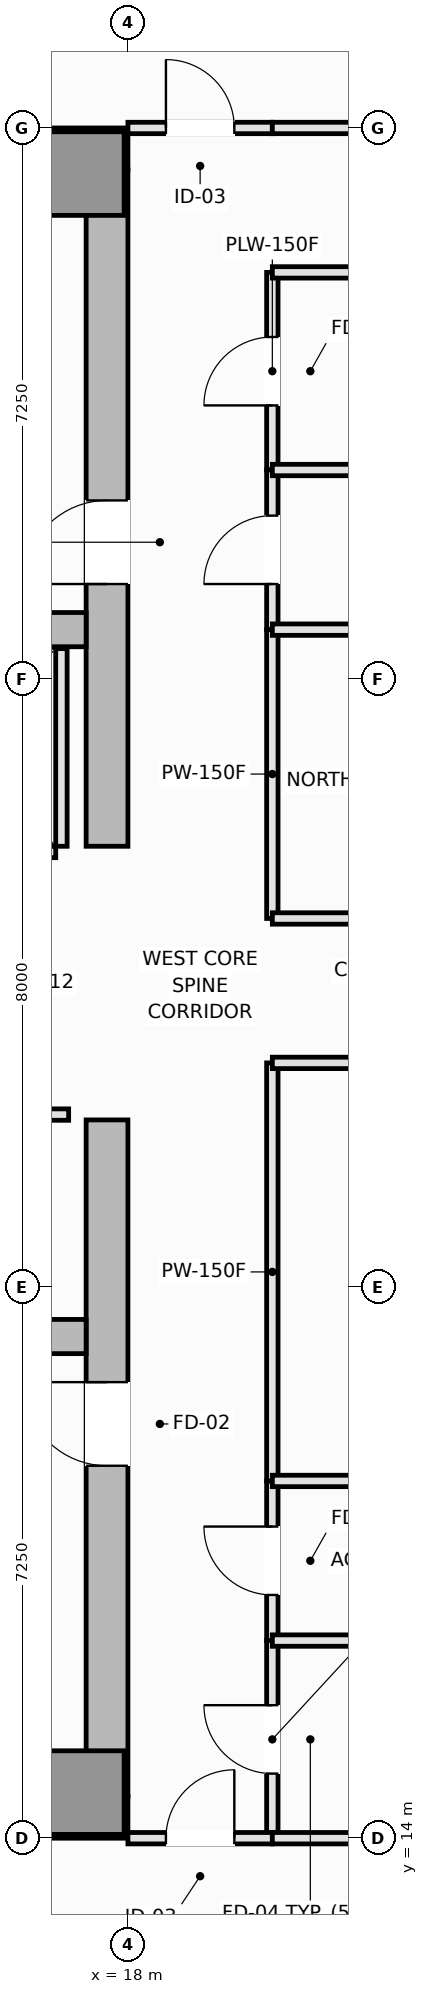
"""IFC4 building model, lengths in metres.
Left out: names, types, materials, properties, quantities, classifications, styles, units other than length and angle.
Written with IfcOpenShell. Run it as: python <this file> out.ifc"""

import sys

from ifc_helpers import new_model, si_unit, direction, frame, frame_2d, origin, origin_2d, place, context, subcontext, project, spatial, rectangle, extrude, element, fill, save


model = new_model("IFC4")
c1 = context("Model", 3, precision=1e-05, world=origin(), true_north=direction((0.0, 1.0)))
c2 = subcontext(c1, "Body", "Model", "MODEL_VIEW")
j1 = project(units=[si_unit("LENGTHUNIT", "METRE"), si_unit("PLANEANGLEUNIT", "RADIAN")], contexts=[c1])
p1 = place(None, origin())
s1 = spatial("IfcSite", under=j1, at=p1, CompositionType="ELEMENT")
p2 = place(p1, origin())
s2 = spatial("IfcBuilding", under=s1, at=p2, CompositionType="ELEMENT")
p3 = place(p2, frame((0.0, 0.0, 188.05)))
s3 = spatial("IfcBuildingStorey", under=s2, at=p3, CompositionType="ELEMENT", Elevation=188.05)
for number, where, z_axis, x_axis in (
    (1, (4.5, 14.275, 0.0), (0.0, 0.0, 1.0), (1.0, 0.0, 0.0)),
    (2, (4.5, 36.225, 0.0), (0.0, 0.0, 1.0), (1.0, 0.0, 0.0)),
):
    element("IfcWall", number, at=place(p3, frame(where, z_axis=z_axis, x_axis=x_axis)), inside=s3, PredefinedType="SHEAR", context=c2, shape_type="SweptSolid", body=[
        extrude(rectangle(XDim=13.5, YDim=0.55, at=frame_2d((6.75, 0.0))), origin(), (0.0, 0.0, 1.0), 3.55),
    ])
p4 = place(p3, frame((17.725, 14.55, 0.0), z_axis=(0.0, 0.0, 1.0), x_axis=(0.0, 1.0, 0.0)))
e3 = element("IfcWall", 3, at=p4, inside=s3, PredefinedType="SHEAR", context=c2, shape_type="SweptSolid", body=[
    extrude(rectangle(XDim=8.9, YDim=0.55, at=frame_2d((4.45, 0.0))), origin(), (0.0, 0.0, 1.0), 3.55),
])
p5 = place(p4, frame((4.35, 0.0, 0.0)))
e4 = element("IfcOpeningElement", 4, at=p5, cuts=e3, PredefinedType="OPENING", context=c2, shape_type="SweptSolid", body=[
    extrude(rectangle(XDim=1.1, YDim=2.15, at=frame_2d((0.55, 1.075))), frame((0.0, 0.285, 0.0), z_axis=(0.0, -1.0, 0.0), x_axis=(1.0, 0.0, 0.0)), (0.0, 0.0, 1.0), 0.57),
])
p6 = place(p3, frame((17.725, 27.05, 0.0), z_axis=(0.0, 0.0, 1.0), x_axis=(0.0, 1.0, 0.0)))
e5 = element("IfcWall", 5, at=p6, inside=s3, PredefinedType="SHEAR", context=c2, shape_type="SweptSolid", body=[
    extrude(rectangle(XDim=8.9, YDim=0.55, at=frame_2d((4.45, 0.0))), origin(), (0.0, 0.0, 1.0), 3.55),
])
p7 = place(p6, frame((3.45, 0.0, 0.0)))
e6 = element("IfcOpeningElement", 6, at=p7, cuts=e5, PredefinedType="OPENING", context=c2, shape_type="SweptSolid", body=[
    extrude(rectangle(XDim=1.1, YDim=2.15, at=frame_2d((0.55, 1.075))), frame((0.0, 0.285, 0.0), z_axis=(0.0, -1.0, 0.0), x_axis=(1.0, 0.0, 0.0)), (0.0, 0.0, 1.0), 0.57),
])
for number, where, z_axis, x_axis in (
    (7, (5.05, 20.6, 0.0), (0.0, 0.0, 1.0), (1.0, 0.0, 0.0)),
    (8, (5.05, 29.9, 0.0), (0.0, 0.0, 1.0), (1.0, 0.0, 0.0)),
):
    element("IfcWall", number, at=place(p3, frame(where, z_axis=z_axis, x_axis=x_axis)), inside=s3, PredefinedType="SHEAR", context=c2, shape_type="SweptSolid", body=[
        extrude(rectangle(XDim=12.4, YDim=0.45, at=frame_2d((6.2, 0.0))), origin(), (0.0, 0.0, 1.0), 3.55),
    ])
for number, where, z_axis, x_axis in (
    (9, (17.4, 14.6, 0.0), (0.0, 0.0, 1.0), (1.0, 0.0, 0.0)),
    (10, (17.4, 35.9, 0.0), (0.0, 0.0, 1.0), (1.0, 0.0, 0.0)),
):
    element("IfcColumn", number, at=place(p3, frame(where, z_axis=z_axis, x_axis=x_axis)), inside=s3, PredefinedType="PILASTER", context=c2, shape_type="SweptSolid", body=[
        extrude(rectangle(XDim=1.1, YDim=1.1, at=origin_2d()), origin(), (0.0, 0.0, 1.0), 3.55),
    ])
p8 = place(p3, frame((14.5, 26.975, 0.0), z_axis=(0.0, 0.0, 1.0), x_axis=(1.0, 0.0, 0.0)))
e11 = element("IfcWall", 11, at=p8, inside=s3, PredefinedType="PARTITIONING", context=c2, shape_type="SweptSolid", body=[
    extrude(rectangle(XDim=2.55, YDim=0.15, at=frame_2d((1.275, 0.0))), origin(), (0.0, 0.0, 1.0), 3.37),
])
p9 = place(p8, frame((0.625, 0.0, 0.0)))
e12 = element("IfcOpeningElement", 12, at=p9, cuts=e11, PredefinedType="OPENING", context=c2, shape_type="SweptSolid", body=[
    extrude(rectangle(XDim=1.3, YDim=2.2, at=frame_2d((0.65, 1.1))), frame((0.0, 0.085, 0.0), z_axis=(0.0, -1.0, 0.0), x_axis=(1.0, 0.0, 0.0)), (0.0, 0.0, 1.0), 0.17),
])
p10 = place(p3, frame((17.125, 27.05, 0.0), z_axis=(0.0, 0.0, 1.0), x_axis=(0.0, 1.0, 0.0)))
e13 = element("IfcWall", 13, at=p10, inside=s3, PredefinedType="PARTITIONING", context=c2, shape_type="SweptSolid", body=[
    extrude(rectangle(XDim=2.6, YDim=0.15, at=frame_2d((1.3, 0.0))), origin(), (0.0, 0.0, 1.0), 3.37),
])
p11 = place(p3, frame((16.05, 23.52, 0.0), z_axis=(0.0, 0.0, 1.0), x_axis=(1.0, 0.0, 0.0)))
e14 = element("IfcWall", 14, at=p11, inside=s3, PredefinedType="PARTITIONING", context=c2, shape_type="SweptSolid", body=[
    extrude(rectangle(XDim=1.17, YDim=0.15, at=frame_2d((0.585, 0.0))), origin(), (0.0, 0.0, 1.0), 3.37),
])
p12 = place(p3, frame((19.9, 14.0, 0.0), z_axis=(0.0, 0.0, 1.0), x_axis=(0.0, 1.0, 0.0)))
e15 = element("IfcWall", 15, at=p12, inside=s3, PredefinedType="PLUMBINGWALL", context=c2, shape_type="SweptSolid", body=[
    extrude(rectangle(XDim=2.6, YDim=0.15, at=frame_2d((1.3, 0.0))), origin(), (0.0, 0.0, 1.0), 3.37),
])
p13 = place(p12, frame((0.85, 0.0, 0.0)))
e16 = element("IfcOpeningElement", 16, at=p13, cuts=e15, PredefinedType="OPENING", context=c2, shape_type="SweptSolid", body=[
    extrude(rectangle(XDim=0.9, YDim=2.1, at=frame_2d((0.45, 1.05))), frame((0.0, 0.085, 0.0), z_axis=(0.0, -1.0, 0.0), x_axis=(1.0, 0.0, 0.0)), (0.0, 0.0, 1.0), 0.17),
])
p14 = place(p3, frame((19.9, 32.0, 0.0), z_axis=(0.0, 0.0, 1.0), x_axis=(0.0, 1.0, 0.0)))
e17 = element("IfcWall", 17, at=p14, inside=s3, PredefinedType="PLUMBINGWALL", context=c2, shape_type="SweptSolid", body=[
    extrude(rectangle(XDim=2.6, YDim=0.15, at=frame_2d((1.3, 0.0))), origin(), (0.0, 0.0, 1.0), 3.37),
])
p15 = place(p14, frame((0.85, 0.0, 0.0)))
e18 = element("IfcOpeningElement", 18, at=p15, cuts=e17, PredefinedType="OPENING", context=c2, shape_type="SweptSolid", body=[
    extrude(rectangle(XDim=0.9, YDim=2.1, at=frame_2d((0.45, 1.05))), frame((0.0, 0.085, 0.0), z_axis=(0.0, -1.0, 0.0), x_axis=(1.0, 0.0, 0.0)), (0.0, 0.0, 1.0), 0.17),
])
p16 = place(p3, frame((19.9, 16.6, 0.0), z_axis=(0.0, 0.0, 1.0), x_axis=(0.0, 1.0, 0.0)))
e19 = element("IfcWall", 19, at=p16, inside=s3, PredefinedType="PLUMBINGWALL", context=c2, shape_type="SweptSolid", body=[
    extrude(rectangle(XDim=2.1, YDim=0.15, at=frame_2d((1.05, 0.0))), origin(), (0.0, 0.0, 1.0), 3.37),
])
p17 = place(p16, frame((0.6, 0.0, 0.0)))
e20 = element("IfcOpeningElement", 20, at=p17, cuts=e19, PredefinedType="OPENING", context=c2, shape_type="SweptSolid", body=[
    extrude(rectangle(XDim=0.9, YDim=2.1, at=frame_2d((0.45, 1.05))), frame((0.0, 0.085, 0.0), z_axis=(0.0, -1.0, 0.0), x_axis=(1.0, 0.0, 0.0)), (0.0, 0.0, 1.0), 0.17),
])
p18 = place(p3, frame((19.9, 29.9, 0.0), z_axis=(0.0, 0.0, 1.0), x_axis=(0.0, 1.0, 0.0)))
e21 = element("IfcWall", 21, at=p18, inside=s3, PredefinedType="PLUMBINGWALL", context=c2, shape_type="SweptSolid", body=[
    extrude(rectangle(XDim=2.1, YDim=0.15, at=frame_2d((1.05, 0.0))), origin(), (0.0, 0.0, 1.0), 3.37),
])
p19 = place(p18, frame((0.6, 0.0, 0.0)))
e22 = element("IfcOpeningElement", 22, at=p19, cuts=e21, PredefinedType="OPENING", context=c2, shape_type="SweptSolid", body=[
    extrude(rectangle(XDim=0.9, YDim=2.1, at=frame_2d((0.45, 1.05))), frame((0.0, 0.085, 0.0), z_axis=(0.0, -1.0, 0.0), x_axis=(1.0, 0.0, 0.0)), (0.0, 0.0, 1.0), 0.17),
])
p20 = place(p3, frame((19.9, 18.7, 0.0), z_axis=(0.0, 0.0, 1.0), x_axis=(0.0, 1.0, 0.0)))
e23 = element("IfcWall", 23, at=p20, inside=s3, PredefinedType="PARTITIONING", context=c2, shape_type="SweptSolid", body=[
    extrude(rectangle(XDim=5.5, YDim=0.15, at=frame_2d((2.75, 0.0))), origin(), (0.0, 0.0, 1.0), 3.37),
])
p21 = place(p3, frame((19.9, 26.1, 0.0), z_axis=(0.0, 0.0, 1.0), x_axis=(0.0, 1.0, 0.0)))
e24 = element("IfcWall", 24, at=p21, inside=s3, PredefinedType="PARTITIONING", context=c2, shape_type="SweptSolid", body=[
    extrude(rectangle(XDim=3.8, YDim=0.15, at=frame_2d((1.9, 0.0))), origin(), (0.0, 0.0, 1.0), 3.37),
])
p22 = place(p3, frame((18.0, 14.0, 0.0), z_axis=(0.0, 0.0, 1.0), x_axis=(1.0, 0.0, 0.0)))
e25 = element("IfcWall", 25, at=p22, inside=s3, PredefinedType="PARTITIONING", context=c2, shape_type="SweptSolid", body=[
    extrude(rectangle(XDim=1.9, YDim=0.15, at=frame_2d((0.95, 0.0))), origin(), (0.0, 0.0, 1.0), 3.37),
])
p23 = place(p22, frame((0.5, 0.0, 0.0)))
e26 = element("IfcOpeningElement", 26, at=p23, cuts=e25, PredefinedType="OPENING", context=c2, shape_type="SweptSolid", body=[
    extrude(rectangle(XDim=0.9, YDim=2.1, at=frame_2d((0.45, 1.05))), frame((0.0, 0.085, 0.0), z_axis=(0.0, -1.0, 0.0), x_axis=(1.0, 0.0, 0.0)), (0.0, 0.0, 1.0), 0.17),
])
p24 = place(p3, frame((18.0, 36.5, 0.0), z_axis=(0.0, 0.0, 1.0), x_axis=(1.0, 0.0, 0.0)))
e27 = element("IfcWall", 27, at=p24, inside=s3, PredefinedType="PARTITIONING", context=c2, shape_type="SweptSolid", body=[
    extrude(rectangle(XDim=1.9, YDim=0.15, at=frame_2d((0.95, 0.0))), origin(), (0.0, 0.0, 1.0), 3.37),
])
p25 = place(p24, frame((0.5, 0.0, 0.0)))
e28 = element("IfcOpeningElement", 28, at=p25, cuts=e27, PredefinedType="OPENING", context=c2, shape_type="SweptSolid", body=[
    extrude(rectangle(XDim=0.9, YDim=2.1, at=frame_2d((0.45, 1.05))), frame((0.0, 0.085, 0.0), z_axis=(0.0, -1.0, 0.0), x_axis=(1.0, 0.0, 0.0)), (0.0, 0.0, 1.0), 0.17),
])
p26 = place(p3, frame((19.9, 24.2, 0.0), z_axis=(0.0, 0.0, 1.0), x_axis=(1.0, 0.0, 0.0)))
e29 = element("IfcWall", 29, at=p26, inside=s3, PredefinedType="PARTITIONING", context=c2, shape_type="SweptSolid", body=[
    extrude(rectangle(XDim=10.9, YDim=0.15, at=frame_2d((5.45, 0.0))), origin(), (0.0, 0.0, 1.0), 3.37),
])
p27 = place(p26, frame((4.95, 0.0, 0.0)))
e30 = element("IfcOpeningElement", 30, at=p27, cuts=e29, PredefinedType="OPENING", context=c2, shape_type="SweptSolid", body=[
    extrude(rectangle(XDim=1.0, YDim=2.15, at=frame_2d((0.5, 1.075))), frame((0.0, 0.085, 0.0), z_axis=(0.0, -1.0, 0.0), x_axis=(1.0, 0.0, 0.0)), (0.0, 0.0, 1.0), 0.17),
])
p28 = place(p3, frame((19.9, 26.1, 0.0), z_axis=(0.0, 0.0, 1.0), x_axis=(1.0, 0.0, 0.0)))
e31 = element("IfcWall", 31, at=p28, inside=s3, PredefinedType="PARTITIONING", context=c2, shape_type="SweptSolid", body=[
    extrude(rectangle(XDim=10.9, YDim=0.15, at=frame_2d((5.45, 0.0))), origin(), (0.0, 0.0, 1.0), 3.37),
])
p29 = place(p28, frame((4.95, 0.0, 0.0)))
e32 = element("IfcOpeningElement", 32, at=p29, cuts=e31, PredefinedType="OPENING", context=c2, shape_type="SweptSolid", body=[
    extrude(rectangle(XDim=1.0, YDim=2.15, at=frame_2d((0.5, 1.075))), frame((0.0, 0.085, 0.0), z_axis=(0.0, -1.0, 0.0), x_axis=(1.0, 0.0, 0.0)), (0.0, 0.0, 1.0), 0.17),
])
p30 = place(p3, frame((19.9, 34.6, 0.0), z_axis=(0.0, 0.0, 1.0), x_axis=(1.0, 0.0, 0.0)))
e33 = element("IfcWall", 33, at=p30, inside=s3, PredefinedType="PLUMBINGWALL", context=c2, shape_type="SweptSolid", body=[
    extrude(rectangle(XDim=3.6, YDim=0.15, at=frame_2d((1.8, 0.0))), origin(), (0.0, 0.0, 1.0), 3.37),
])
p31 = place(p3, frame((19.9, 36.5, 0.0), z_axis=(0.0, 0.0, 1.0), x_axis=(1.0, 0.0, 0.0)))
e34 = element("IfcWall", 34, at=p31, inside=s3, PredefinedType="PARTITIONING", context=c2, shape_type="SweptSolid", body=[
    extrude(rectangle(XDim=7.6, YDim=0.15, at=frame_2d((3.8, 0.0))), origin(), (0.0, 0.0, 1.0), 3.37),
])
for number, where, z_axis, x_axis in (
    (35, (19.9, 16.6, 0.0), (0.0, 0.0, 1.0), (1.0, 0.0, 0.0)),
    (36, (19.9, 14.0, 0.0), (0.0, 0.0, 1.0), (1.0, 0.0, 0.0)),
):
    element("IfcWall", number, at=place(p3, frame(where, z_axis=z_axis, x_axis=x_axis)), inside=s3, PredefinedType="PLUMBINGWALL", context=c2, shape_type="SweptSolid", body=[
        extrude(rectangle(XDim=3.6, YDim=0.15, at=frame_2d((1.8, 0.0))), origin(), (0.0, 0.0, 1.0), 3.37),
    ])
p32 = place(p3, frame((19.9, 32.0, 0.0), z_axis=(0.0, 0.0, 1.0), x_axis=(1.0, 0.0, 0.0)))
e37 = element("IfcWall", 37, at=p32, inside=s3, PredefinedType="PLUMBINGWALL", context=c2, shape_type="SweptSolid", body=[
    extrude(rectangle(XDim=3.6, YDim=0.15, at=frame_2d((1.8, 0.0))), origin(), (0.0, 0.0, 1.0), 2.87),
])
for number, where, z_axis, x_axis in (
    (38, (19.9, 18.7, 0.0), (0.0, 0.0, 1.0), (1.0, 0.0, 0.0)),
    (39, (19.9, 29.9, 0.0), (0.0, 0.0, 1.0), (1.0, 0.0, 0.0)),
):
    element("IfcWall", number, at=place(p3, frame(where, z_axis=z_axis, x_axis=x_axis)), inside=s3, PredefinedType="PLUMBINGWALL", context=c2, shape_type="SweptSolid", body=[
        extrude(rectangle(XDim=3.6, YDim=0.15, at=frame_2d((1.8, 0.0))), origin(), (0.0, 0.0, 1.0), 3.37),
    ])
p33 = place(p5, origin())
e40 = element("IfcDoor", 40, at=p33, inside=s3, OperationType="SINGLE_SWING_RIGHT", PredefinedType="DOOR", context=c2, shape_type="SweptSolid", body=[
    extrude(rectangle(XDim=1.1, YDim=2.15, at=frame_2d((0.55, 1.075))), frame((0.0, 0.025, 0.0), z_axis=(0.0, -1.0, 0.0), x_axis=(1.0, 0.0, 0.0)), (0.0, 0.0, 1.0), 0.05),
])
fill(e4, e40)
p34 = place(p7, origin())
e41 = element("IfcDoor", 41, at=p34, inside=s3, OperationType="SINGLE_SWING_LEFT", PredefinedType="DOOR", context=c2, shape_type="SweptSolid", body=[
    extrude(rectangle(XDim=1.1, YDim=2.15, at=frame_2d((0.55, 1.075))), frame((0.0, 0.025, 0.0), z_axis=(0.0, -1.0, 0.0), x_axis=(1.0, 0.0, 0.0)), (0.0, 0.0, 1.0), 0.05),
])
fill(e6, e41)
p35 = place(p13, origin())
e42 = element("IfcDoor", 42, at=p35, inside=s3, OperationType="SINGLE_SWING_RIGHT", PredefinedType="DOOR", context=c2, shape_type="SweptSolid", body=[
    extrude(rectangle(XDim=0.9, YDim=2.1, at=frame_2d((0.45, 1.05))), frame((0.0, 0.025, 0.0), z_axis=(0.0, -1.0, 0.0), x_axis=(1.0, 0.0, 0.0)), (0.0, 0.0, 1.0), 0.05),
])
fill(e16, e42)
p36 = place(p15, origin())
e43 = element("IfcDoor", 43, at=p36, inside=s3, OperationType="SINGLE_SWING_LEFT", PredefinedType="DOOR", context=c2, shape_type="SweptSolid", body=[
    extrude(rectangle(XDim=0.9, YDim=2.1, at=frame_2d((0.45, 1.05))), frame((0.0, 0.025, 0.0), z_axis=(0.0, -1.0, 0.0), x_axis=(1.0, 0.0, 0.0)), (0.0, 0.0, 1.0), 0.05),
])
fill(e18, e43)
p37 = place(p17, origin())
e44 = element("IfcDoor", 44, at=p37, inside=s3, OperationType="SINGLE_SWING_RIGHT", PredefinedType="DOOR", context=c2, shape_type="SweptSolid", body=[
    extrude(rectangle(XDim=0.9, YDim=2.1, at=frame_2d((0.45, 1.05))), frame((0.0, 0.025, 0.0), z_axis=(0.0, -1.0, 0.0), x_axis=(1.0, 0.0, 0.0)), (0.0, 0.0, 1.0), 0.05),
])
fill(e20, e44)
p38 = place(p19, origin())
e45 = element("IfcDoor", 45, at=p38, inside=s3, OperationType="SINGLE_SWING_LEFT", PredefinedType="DOOR", context=c2, shape_type="SweptSolid", body=[
    extrude(rectangle(XDim=0.9, YDim=2.1, at=frame_2d((0.45, 1.05))), frame((0.0, 0.025, 0.0), z_axis=(0.0, -1.0, 0.0), x_axis=(1.0, 0.0, 0.0)), (0.0, 0.0, 1.0), 0.05),
])
fill(e22, e45)
p39 = place(p23, origin())
e46 = element("IfcDoor", 46, at=p39, inside=s3, OperationType="SINGLE_SWING_RIGHT", PredefinedType="DOOR", context=c2, shape_type="SweptSolid", body=[
    extrude(rectangle(XDim=0.9, YDim=2.1, at=frame_2d((0.45, 1.05))), frame((0.0, 0.025, 0.0), z_axis=(0.0, -1.0, 0.0), x_axis=(1.0, 0.0, 0.0)), (0.0, 0.0, 1.0), 0.05),
])
fill(e26, e46)
p40 = place(p25, origin())
e47 = element("IfcDoor", 47, at=p40, inside=s3, OperationType="SINGLE_SWING_LEFT", PredefinedType="DOOR", context=c2, shape_type="SweptSolid", body=[
    extrude(rectangle(XDim=0.9, YDim=2.1, at=frame_2d((0.45, 1.05))), frame((0.0, 0.025, 0.0), z_axis=(0.0, -1.0, 0.0), x_axis=(1.0, 0.0, 0.0)), (0.0, 0.0, 1.0), 0.05),
])
fill(e28, e47)
save(model, sys.argv[1])
